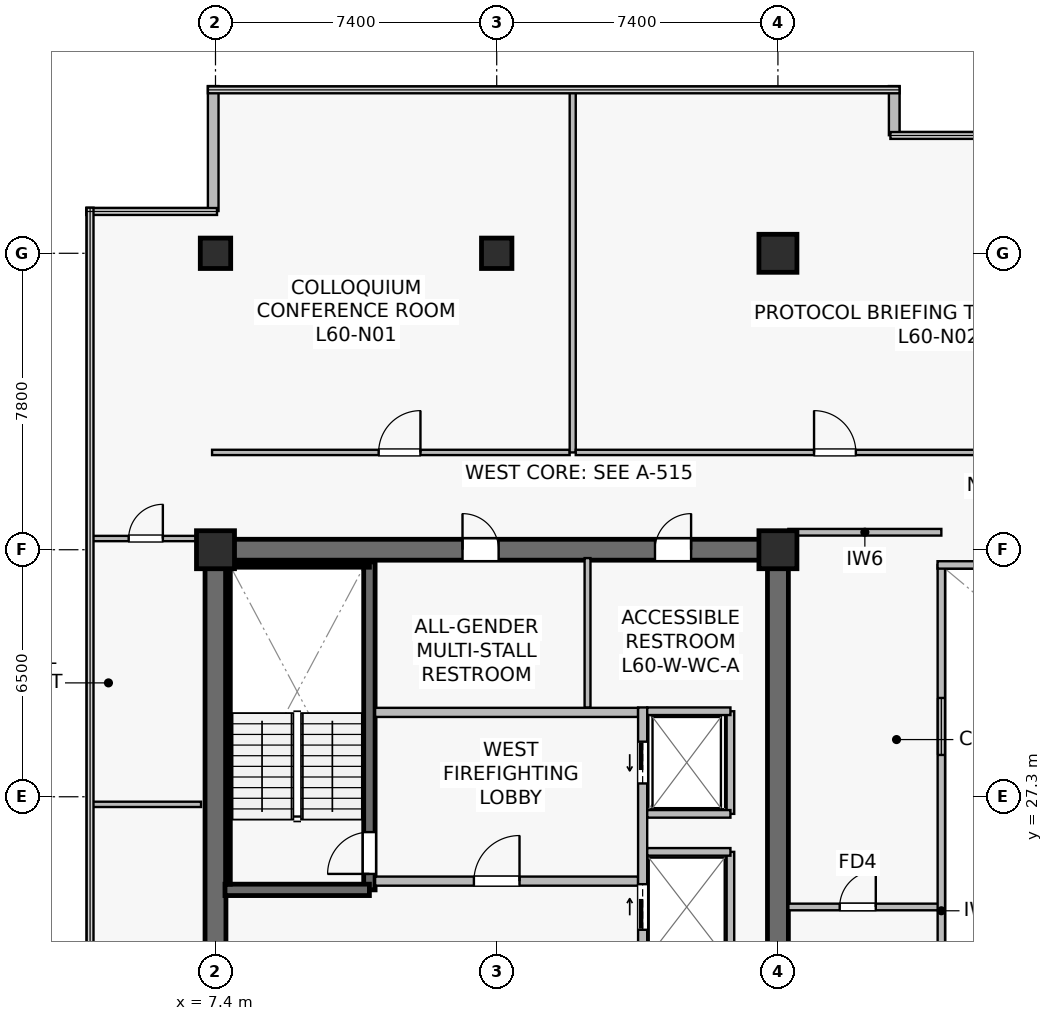
"""IFC4 building model, lengths in metres.
Left out: names, types, materials, properties, quantities, classifications, styles, units other than length and angle.
Written with IfcOpenShell. Run it as: python <this file> out.ifc"""

import sys

from ifc_helpers import new_model, si_unit, direction, frame, frame_2d, origin, origin_2d, place, context, subcontext, project, spatial, rectangle, extrude, source, transform, mapped, element, fill, save


model = new_model("IFC4")
c1 = context("Model", 3, precision=1e-05, world=origin(), true_north=direction((0.0, 1.0)))
c2 = subcontext(c1, "Body", "Model", "MODEL_VIEW")
j1 = project(units=[si_unit("LENGTHUNIT", "METRE"), si_unit("PLANEANGLEUNIT", "RADIAN")], contexts=[c1])
p1 = place(None, origin())
s1 = spatial("IfcSite", under=j1, at=p1, CompositionType="ELEMENT")
p2 = place(p1, origin())
s2 = spatial("IfcBuilding", under=s1, at=p2, CompositionType="ELEMENT")
p3 = place(p2, frame((0.0, 0.0, 250.6)))
s3 = spatial("IfcBuildingStorey", under=s2, at=p3, CompositionType="ELEMENT", Elevation=250.6)
p4 = place(p3, frame((7.125, 33.8, 0.0), z_axis=(0.0, 0.0, 1.0), x_axis=(1.0, 0.0, 0.0)))
e1 = element("IfcWall", 1, at=p4, inside=s3, PredefinedType="SHEAR", context=c2, shape_type="SweptSolid", body=[
    extrude(rectangle(XDim=15.35, YDim=0.55, at=frame_2d((7.675, 0.0))), origin(), (0.0, 0.0, 1.0), 3.8),
])
p5 = place(p4, frame((6.775, 0.0, 0.0)))
e2 = element("IfcOpeningElement", 2, at=p5, cuts=e1, PredefinedType="OPENING", context=c2, shape_type="SweptSolid", body=[
    extrude(rectangle(XDim=0.95, YDim=2.15, at=frame_2d((0.475, 1.075))), frame((0.0, 0.285, 0.0), z_axis=(0.0, -1.0, 0.0), x_axis=(1.0, 0.0, 0.0)), (0.0, 0.0, 1.0), 0.57),
])
p6 = place(p4, frame((11.84, 0.0, 0.0)))
e3 = element("IfcOpeningElement", 3, at=p6, cuts=e1, PredefinedType="OPENING", context=c2, shape_type="SweptSolid", body=[
    extrude(rectangle(XDim=0.95, YDim=2.15, at=frame_2d((0.475, 1.075))), frame((0.0, 0.285, 0.0), z_axis=(0.0, -1.0, 0.0), x_axis=(1.0, 0.0, 0.0)), (0.0, 0.0, 1.0), 0.57),
])
p7 = place(p3, frame((7.4, 15.075, 0.0), z_axis=(0.0, 0.0, 1.0), x_axis=(0.0, 1.0, 0.0)))
e4 = element("IfcWall", 4, at=p7, inside=s3, PredefinedType="SHEAR", context=c2, shape_type="SweptSolid", body=[
    extrude(rectangle(XDim=18.45, YDim=0.55, at=frame_2d((9.225, 0.0))), origin(), (0.0, 0.0, 1.0), 3.8),
])
p8 = place(p3, frame((22.2, 15.075, 0.0), z_axis=(0.0, 0.0, 1.0), x_axis=(0.0, 1.0, 0.0)))
e5 = element("IfcWall", 5, at=p8, inside=s3, PredefinedType="SHEAR", context=c2, shape_type="SweptSolid", body=[
    extrude(rectangle(XDim=18.45, YDim=0.55, at=frame_2d((9.225, 0.0))), origin(), (0.0, 0.0, 1.0), 3.8),
])
p9 = place(p8, frame((3.475, 0.0, 0.0)))
e6 = element("IfcOpeningElement", 6, at=p9, cuts=e5, PredefinedType="OPENING", context=c2, shape_type="SweptSolid", body=[
    extrude(rectangle(XDim=1.42, YDim=2.2, at=frame_2d((0.71, 1.1))), frame((0.0, 0.285, 0.0), z_axis=(0.0, -1.0, 0.0), x_axis=(1.0, 0.0, 0.0)), (0.0, 0.0, 1.0), 0.57),
])
p10 = place(p3, frame((11.45, 24.85, 0.0), z_axis=(0.0, 0.0, 1.0), x_axis=(0.0, 1.0, 0.0)))
e7 = element("IfcWall", 7, at=p10, inside=s3, PredefinedType="SHEAR", context=c2, shape_type="SweptSolid", body=[
    extrude(rectangle(XDim=8.63, YDim=0.3, at=frame_2d((4.315, 0.0))), origin(), (0.0, 0.0, 1.0), 3.8),
])
p11 = place(p10, frame((0.42, 0.0, 0.0)))
e8 = element("IfcOpeningElement", 8, at=p11, cuts=e7, PredefinedType="OPENING", context=c2, shape_type="SweptSolid", body=[
    extrude(rectangle(XDim=1.1, YDim=2.15, at=frame_2d((0.55, 1.075))), frame((0.0, 0.16, 0.0), z_axis=(0.0, -1.0, 0.0), x_axis=(1.0, 0.0, 0.0)), (0.0, 0.0, 1.0), 0.32),
])
p12 = place(p3, frame((7.65, 24.85, 0.0), z_axis=(0.0, 0.0, 1.0), x_axis=(1.0, 0.0, 0.0)))
e9 = element("IfcWall", 9, at=p12, inside=s3, PredefinedType="SHEAR", context=c2, shape_type="SweptSolid", body=[
    extrude(rectangle(XDim=3.8, YDim=0.3, at=frame_2d((1.9, 0.0))), origin(), (0.0, 0.0, 1.0), 3.8),
])
p13 = place(p3, frame((7.73, 33.4, 0.0), z_axis=(0.0, 0.0, 1.0), x_axis=(1.0, 0.0, 0.0)))
e10 = element("IfcWall", 10, at=p13, inside=s3, PredefinedType="SOLIDWALL", context=c2, shape_type="SweptSolid", body=[
    extrude(rectangle(XDim=3.72, YDim=0.12, at=frame_2d((1.86, 0.0))), origin(), (0.0, 0.0, 1.0), 3.8),
])
p14 = place(p3, frame((7.73, 25.0, 0.0), z_axis=(0.0, 0.0, 1.0), x_axis=(0.0, 1.0, 0.0)))
e11 = element("IfcWall", 11, at=p14, inside=s3, PredefinedType="SOLIDWALL", context=c2, shape_type="SweptSolid", body=[
    extrude(rectangle(XDim=8.32, YDim=0.12, at=frame_2d((4.16, 0.0))), origin(), (0.0, 0.0, 1.0), 3.8),
])
m1 = source(origin(), c2, "Body", "SweptSolid", [
    extrude(rectangle(XDim=1.0, YDim=1.0, at=origin_2d()), origin(), (0.0, 0.0, 1.0), 4.1),
])
for number, where, z_axis, x_axis in (
    (12, (7.4, 33.8, 0.0), (0.0, 0.0, 1.0), (1.0, 0.0, 0.0)),
    (13, (22.2, 33.8, 0.0), (0.0, 0.0, 1.0), (1.0, 0.0, 0.0)),
):
    element("IfcColumn", number, at=place(p3, frame(where, z_axis=z_axis, x_axis=x_axis)), inside=s3, PredefinedType="COLUMN", context=c2, shape_type="MappedRepresentation", body=[
        mapped(m1, transform((0.0, 0.0, 0.0), scale=1.0)),
    ])
m2 = source(origin(), c2, "Body", "SweptSolid", [
    extrude(rectangle(XDim=0.8, YDim=0.8, at=origin_2d()), origin(), (0.0, 0.0, 1.0), 4.1),
])
p15 = place(p3, frame((14.8, 41.6, 0.0), z_axis=(0.0, 0.0, 1.0), x_axis=(1.0, 0.0, 0.0)))
e14 = element("IfcColumn", 14, at=p15, inside=s3, PredefinedType="COLUMN", context=c2, shape_type="MappedRepresentation", body=[
    mapped(m2, transform((0.0, 0.0, 0.0), scale=1.0)),
])
p16 = place(p3, frame((22.2, 41.6, 0.0), z_axis=(0.0, 0.0, 1.0), x_axis=(1.0, 0.0, 0.0)))
e15 = element("IfcColumn", 15, at=p16, inside=s3, PredefinedType="COLUMN", context=c2, shape_type="MappedRepresentation", body=[
    mapped(m1, transform((0.0, 0.0, 0.0), scale=1.0)),
])
p17 = place(p3, frame((7.4, 41.6, 0.0), z_axis=(0.0, 0.0, 1.0), x_axis=(1.0, 0.0, 0.0)))
e16 = element("IfcColumn", 16, at=p17, inside=s3, PredefinedType="COLUMN", context=c2, shape_type="MappedRepresentation", body=[
    mapped(m2, transform((0.0, 0.0, 0.0), scale=1.0)),
])
p18 = place(p3, frame((25.26, 44.707, 0.0), z_axis=(0.0, 0.0, 1.0), x_axis=(0.0, 1.0, 0.0)))
e17 = element("IfcWall", 17, at=p18, inside=s3, PredefinedType="STANDARD", context=c2, shape_type="SweptSolid", body=[
    extrude(rectangle(XDim=1.293, YDim=0.28, at=frame_2d((0.646, 0.0))), origin(), (0.0, 0.0, 1.0), 3.8),
])
p19 = place(p3, frame((7.34, 46.0, 0.0), z_axis=(0.0, 0.0, 1.0), x_axis=(0.0, -1.0, 0.0)))
e18 = element("IfcWall", 18, at=p19, inside=s3, PredefinedType="STANDARD", context=c2, shape_type="SweptSolid", body=[
    extrude(rectangle(XDim=3.288, YDim=0.28, at=frame_2d((1.644, 0.0))), origin(), (0.0, 0.0, 1.0), 3.8),
])
p20 = place(p3, frame((11.6, 25.08, 0.0), z_axis=(0.0, 0.0, 1.0), x_axis=(1.0, 0.0, 0.0)))
e19 = element("IfcWall", 19, at=p20, inside=s3, PredefinedType="SOLIDWALL", context=c2, shape_type="SweptSolid", body=[
    extrude(rectangle(XDim=6.92, YDim=0.24, at=frame_2d((3.46, 0.0))), origin(), (0.0, 0.0, 1.0), 3.197),
])
p21 = place(p20, frame((2.6, 0.0, 0.0)))
e20 = element("IfcOpeningElement", 20, at=p21, cuts=e19, PredefinedType="OPENING", context=c2, shape_type="SweptSolid", body=[
    extrude(rectangle(XDim=1.2, YDim=2.16, at=frame_2d((0.6, 1.08))), frame((0.0, 0.13, 0.0), z_axis=(0.0, -1.0, 0.0), x_axis=(1.0, 0.0, 0.0)), (0.0, 0.0, 1.0), 0.26),
])
p22 = place(p3, frame((11.6, 29.52, 0.0), z_axis=(0.0, 0.0, 1.0), x_axis=(1.0, 0.0, 0.0)))
e21 = element("IfcWall", 21, at=p22, inside=s3, PredefinedType="SOLIDWALL", context=c2, shape_type="SweptSolid", body=[
    extrude(rectangle(XDim=6.92, YDim=0.24, at=frame_2d((3.46, 0.0))), origin(), (0.0, 0.0, 1.0), 3.197),
])
p23 = place(p3, frame((18.64, 22.8, 0.0), z_axis=(0.0, 0.0, 1.0), x_axis=(0.0, 1.0, 0.0)))
e22 = element("IfcWall", 22, at=p23, inside=s3, PredefinedType="SOLIDWALL", context=c2, shape_type="SweptSolid", body=[
    extrude(rectangle(XDim=6.85, YDim=0.24, at=frame_2d((3.425, 0.0))), origin(), (0.0, 0.0, 1.0), 2.935),
])
p24 = place(p23, frame((4.85, 0.0, 0.0)))
e23 = element("IfcOpeningElement", 23, at=p24, cuts=e22, PredefinedType="OPENING", context=c2, shape_type="SweptSolid", body=[
    extrude(rectangle(XDim=1.1, YDim=2.22, at=frame_2d((0.55, 1.11))), frame((0.0, 0.13, 0.0), z_axis=(0.0, -1.0, 0.0), x_axis=(1.0, 0.0, 0.0)), (0.0, 0.0, 1.0), 0.26),
])
p25 = place(p23, frame((1.0, 0.0, 0.0)))
e24 = element("IfcOpeningElement", 24, at=p25, cuts=e22, PredefinedType="OPENING", context=c2, shape_type="SweptSolid", body=[
    extrude(rectangle(XDim=1.2, YDim=2.22, at=frame_2d((0.6, 1.11))), frame((0.0, 0.13, 0.0), z_axis=(0.0, -1.0, 0.0), x_axis=(1.0, 0.0, 0.0)), (0.0, 0.0, 1.0), 0.26),
])
p26 = place(p3, frame((20.95, 26.85, 0.0), z_axis=(0.0, 0.0, 1.0), x_axis=(0.0, 1.0, 0.0)))
e25 = element("IfcWall", 25, at=p26, inside=s3, PredefinedType="SOLIDWALL", context=c2, shape_type="SweptSolid", body=[
    extrude(rectangle(XDim=2.7, YDim=0.2, at=frame_2d((1.35, 0.0))), origin(), (0.0, 0.0, 1.0), 3.8),
])
p27 = place(p3, frame((18.76, 29.55, 0.0), z_axis=(0.0, 0.0, 1.0), x_axis=(1.0, 0.0, 0.0)))
e26 = element("IfcWall", 26, at=p27, inside=s3, PredefinedType="SOLIDWALL", context=c2, shape_type="SweptSolid", body=[
    extrude(rectangle(XDim=2.19, YDim=0.2, at=frame_2d((1.095, 0.0))), origin(), (0.0, 0.0, 1.0), 3.8),
])
p28 = place(p3, frame((18.76, 26.85, 0.0), z_axis=(0.0, 0.0, 1.0), x_axis=(1.0, 0.0, 0.0)))
e27 = element("IfcWall", 27, at=p28, inside=s3, PredefinedType="SOLIDWALL", context=c2, shape_type="SweptSolid", body=[
    extrude(rectangle(XDim=2.19, YDim=0.2, at=frame_2d((1.095, 0.0))), origin(), (0.0, 0.0, 1.0), 3.197),
])
p29 = place(p3, frame((20.95, 22.95, 0.0), z_axis=(0.0, 0.0, 1.0), x_axis=(0.0, 1.0, 0.0)))
e28 = element("IfcWall", 28, at=p29, inside=s3, PredefinedType="SOLIDWALL", context=c2, shape_type="SweptSolid", body=[
    extrude(rectangle(XDim=2.9, YDim=0.2, at=frame_2d((1.45, 0.0))), origin(), (0.0, 0.0, 1.0), 2.935),
])
p30 = place(p3, frame((18.76, 25.85, 0.0), z_axis=(0.0, 0.0, 1.0), x_axis=(1.0, 0.0, 0.0)))
e29 = element("IfcWall", 29, at=p30, inside=s3, PredefinedType="SOLIDWALL", context=c2, shape_type="SweptSolid", body=[
    extrude(rectangle(XDim=2.19, YDim=0.2, at=frame_2d((1.095, 0.0))), origin(), (0.0, 0.0, 1.0), 3.8),
])
p31 = place(p3, frame((17.19, 29.65, 0.0), z_axis=(0.0, 0.0, 1.0), x_axis=(0.0, 1.0, 0.0)))
e30 = element("IfcWall", 30, at=p31, inside=s3, PredefinedType="PLUMBINGWALL", context=c2, shape_type="SweptSolid", body=[
    extrude(rectangle(XDim=3.93, YDim=0.155, at=frame_2d((1.965, 0.0))), origin(), (0.0, 0.0, 1.0), 3.8),
])
p32 = place(p3, frame((22.475, 34.26, 0.0), z_axis=(0.0, 0.0, 1.0), x_axis=(1.0, 0.0, 0.0)))
e31 = element("IfcWall", 31, at=p32, inside=s3, PredefinedType="PARTITIONING", context=c2, shape_type="SweptSolid", body=[
    extrude(rectangle(XDim=4.025, YDim=0.175, at=frame_2d((2.012, 0.0))), origin(), (0.0, 0.0, 1.0), 3.535),
])
p33 = place(p3, frame((22.475, 24.4, 0.0), z_axis=(0.0, 0.0, 1.0), x_axis=(1.0, 0.0, 0.0)))
e32 = element("IfcWall", 32, at=p33, inside=s3, PredefinedType="PARTITIONING", context=c2, shape_type="SweptSolid", body=[
    extrude(rectangle(XDim=4.025, YDim=0.175, at=frame_2d((2.012, 0.0))), origin(), (0.0, 0.0, 1.0), 3.8),
])
p34 = place(p33, frame((1.35, 0.0, 0.0)))
e33 = element("IfcOpeningElement", 33, at=p34, cuts=e32, PredefinedType="OPENING", context=c2, shape_type="SweptSolid", body=[
    extrude(rectangle(XDim=0.95, YDim=2.15, at=frame_2d((0.475, 1.075))), frame((0.0, 0.098, 0.0), z_axis=(0.0, -1.0, 0.0), x_axis=(1.0, 0.0, 0.0)), (0.0, 0.0, 1.0), 0.195),
])
p35 = place(p3, frame((26.5, 15.2, 0.0), z_axis=(0.0, 0.0, 1.0), x_axis=(0.0, 1.0, 0.0)))
e34 = element("IfcWall", 34, at=p35, inside=s3, PredefinedType="SOLIDWALL", context=c2, shape_type="SweptSolid", body=[
    extrude(rectangle(XDim=18.2, YDim=0.195, at=frame_2d((9.1, 0.0))), origin(), (0.0, 0.0, 1.0), 3.8),
])
p36 = place(p35, frame((1.8, 0.0, 0.9)))
e35 = element("IfcOpeningElement", 35, at=p36, cuts=e34, PredefinedType="OPENING", context=c2, shape_type="SweptSolid", body=[
    extrude(rectangle(XDim=1.5, YDim=1.4, at=frame_2d((0.75, 0.7))), frame((0.0, 0.107, 0.0), z_axis=(0.0, -1.0, 0.0), x_axis=(1.0, 0.0, 0.0)), (0.0, 0.0, 1.0), 0.215),
])
p37 = place(p35, frame((13.2, 0.0, 0.9)))
e36 = element("IfcOpeningElement", 36, at=p37, cuts=e34, PredefinedType="OPENING", context=c2, shape_type="SweptSolid", body=[
    extrude(rectangle(XDim=1.5, YDim=1.4, at=frame_2d((0.75, 0.7))), frame((0.0, 0.107, 0.0), z_axis=(0.0, -1.0, 0.0), x_axis=(1.0, 0.0, 0.0)), (0.0, 0.0, 1.0), 0.215),
])
p38 = place(p3, frame((26.4, 33.4, 0.0), z_axis=(0.0, 0.0, 1.0), x_axis=(1.0, 0.0, 0.0)))
e37 = element("IfcWall", 37, at=p38, inside=s3, PredefinedType="SOLIDWALL", context=c2, shape_type="SweptSolid", body=[
    extrude(rectangle(XDim=22.0, YDim=0.195, at=frame_2d((11.0, 0.0))), origin(), (0.0, 0.0, 1.0), 3.8),
])
p39 = place(p3, frame((7.31, 36.36, 0.0), z_axis=(0.0, 0.0, 1.0), x_axis=(1.0, 0.0, 0.0)))
e38 = element("IfcWall", 38, at=p39, inside=s3, PredefinedType="PARTITIONING", context=c2, shape_type="SweptSolid", body=[
    extrude(rectangle(XDim=9.41, YDim=0.14, at=frame_2d((4.705, 0.0))), origin(), (0.0, 0.0, 1.0), 3.197),
])
p40 = place(p39, frame((4.383, 0.0, 0.0)))
e39 = element("IfcOpeningElement", 39, at=p40, cuts=e38, PredefinedType="OPENING", context=c2, shape_type="SweptSolid", body=[
    extrude(rectangle(XDim=1.1, YDim=2.18, at=frame_2d((0.55, 1.09))), frame((0.0, 0.08, 0.0), z_axis=(0.0, -1.0, 0.0), x_axis=(1.0, 0.0, 0.0)), (0.0, 0.0, 1.0), 0.16),
])
p41 = place(p3, frame((16.8, 36.36, 0.0), z_axis=(0.0, 0.0, 1.0), x_axis=(0.0, 1.0, 0.0)))
e40 = element("IfcWall", 40, at=p41, inside=s3, PredefinedType="PARTITIONING", context=c2, shape_type="SweptSolid", body=[
    extrude(rectangle(XDim=9.53, YDim=0.16, at=frame_2d((4.765, 0.0))), origin(), (0.0, 0.0, 1.0), 3.135),
])
p42 = place(p3, frame((16.88, 36.36, 0.0), z_axis=(0.0, 0.0, 1.0), x_axis=(1.0, 0.0, 0.0)))
e41 = element("IfcWall", 41, at=p42, inside=s3, PredefinedType="PARTITIONING", context=c2, shape_type="SweptSolid", body=[
    extrude(rectangle(XDim=16.24, YDim=0.14, at=frame_2d((8.12, 0.0))), origin(), (0.0, 0.0, 1.0), 3.197),
])
p43 = place(p42, frame((6.271, 0.0, 0.0)))
e42 = element("IfcOpeningElement", 42, at=p43, cuts=e41, PredefinedType="OPENING", context=c2, shape_type="SweptSolid", body=[
    extrude(rectangle(XDim=1.1, YDim=2.18, at=frame_2d((0.55, 1.09))), frame((0.0, 0.08, 0.0), z_axis=(0.0, -1.0, 0.0), x_axis=(1.0, 0.0, 0.0)), (0.0, 0.0, 1.0), 0.16),
])
p44 = place(p3, frame((4.11, 27.1, 0.0), z_axis=(0.0, 0.0, 1.0), x_axis=(1.0, 0.0, 0.0)))
e43 = element("IfcWall", 43, at=p44, inside=s3, PredefinedType="PARTITIONING", context=c2, shape_type="SweptSolid", body=[
    extrude(rectangle(XDim=2.91, YDim=0.14, at=frame_2d((1.455, 0.0))), origin(), (0.0, 0.0, 1.0), 3.8),
])
p45 = place(p3, frame((4.11, 34.095, 0.0), z_axis=(0.0, 0.0, 1.0), x_axis=(1.0, 0.0, 0.0)))
e44 = element("IfcWall", 44, at=p45, inside=s3, PredefinedType="PARTITIONING", context=c2, shape_type="SweptSolid", body=[
    extrude(rectangle(XDim=2.91, YDim=0.14, at=frame_2d((1.455, 0.0))), origin(), (0.0, 0.0, 1.0), 3.8),
])
p46 = place(p45, frame((1.005, 0.0, 0.0)))
e45 = element("IfcOpeningElement", 45, at=p46, cuts=e44, PredefinedType="OPENING", context=c2, shape_type="SweptSolid", body=[
    extrude(rectangle(XDim=0.9, YDim=2.1, at=frame_2d((0.45, 1.05))), frame((0.0, 0.08, 0.0), z_axis=(0.0, -1.0, 0.0), x_axis=(1.0, 0.0, 0.0)), (0.0, 0.0, 1.0), 0.16),
])
m3 = source(origin(), c2, "Body", "SweptSolid", [
    extrude(rectangle(XDim=1.5, YDim=1.4, at=frame_2d((0.75, 0.7))), frame((0.0, 0.03, 0.0), z_axis=(0.0, -1.0, 0.0), x_axis=(1.0, 0.0, 0.0)), (0.0, 0.0, 1.0), 0.06),
])
p47 = place(p37, origin())
e46 = element("IfcWindow", 46, at=p47, inside=s3, PartitioningType="SINGLE_PANEL", PredefinedType="WINDOW", context=c2, shape_type="MappedRepresentation", body=[
    mapped(m3, transform((0.0, 0.0, 0.0), scale=1.0)),
])
fill(e36, e46)
m4 = source(origin(), c2, "Body", "SweptSolid", [
    extrude(rectangle(XDim=1.1, YDim=2.15, at=frame_2d((0.55, 1.075))), frame((0.0, 0.025, 0.0), z_axis=(0.0, -1.0, 0.0), x_axis=(1.0, 0.0, 0.0)), (0.0, 0.0, 1.0), 0.05),
])
p48 = place(p11, origin())
e47 = element("IfcDoor", 47, at=p48, inside=s3, OperationType="SINGLE_SWING_LEFT", PredefinedType="DOOR", context=c2, shape_type="MappedRepresentation", body=[
    mapped(m4, transform((0.0, 0.0, 0.0), scale=1.0)),
])
fill(e8, e47)
m5 = source(origin(), c2, "Body", "SweptSolid", [
    extrude(rectangle(XDim=1.2, YDim=2.16, at=frame_2d((0.6, 1.08))), frame((0.0, 0.025, 0.0), z_axis=(0.0, -1.0, 0.0), x_axis=(1.0, 0.0, 0.0)), (0.0, 0.0, 1.0), 0.05),
])
p49 = place(p21, origin())
e48 = element("IfcDoor", 48, at=p49, inside=s3, OperationType="SINGLE_SWING_RIGHT", PredefinedType="DOOR", context=c2, shape_type="MappedRepresentation", body=[
    mapped(m5, transform((0.0, 0.0, 0.0), scale=1.0)),
])
fill(e20, e48)
m6 = source(origin(), c2, "Body", "SweptSolid", [
    extrude(rectangle(XDim=1.1, YDim=2.22, at=frame_2d((0.55, 1.11))), frame((0.0, 0.025, 0.0), z_axis=(0.0, -1.0, 0.0), x_axis=(1.0, 0.0, 0.0)), (0.0, 0.0, 1.0), 0.05),
])
p50 = place(p24, origin())
e49 = element("IfcDoor", 49, at=p50, inside=s3, OperationType="SLIDING_TO_LEFT", PredefinedType="USERDEFINED", context=c2, shape_type="MappedRepresentation", body=[
    mapped(m6, transform((0.0, 0.0, 0.0), scale=1.0)),
])
fill(e23, e49)
m7 = source(origin(), c2, "Body", "SweptSolid", [
    extrude(rectangle(XDim=1.2, YDim=2.22, at=frame_2d((0.6, 1.11))), frame((0.0, 0.025, 0.0), z_axis=(0.0, -1.0, 0.0), x_axis=(1.0, 0.0, 0.0)), (0.0, 0.0, 1.0), 0.05),
])
p51 = place(p25, origin())
e50 = element("IfcDoor", 50, at=p51, inside=s3, OperationType="SLIDING_TO_RIGHT", PredefinedType="USERDEFINED", context=c2, shape_type="MappedRepresentation", body=[
    mapped(m7, transform((0.0, 0.0, 0.0), scale=1.0)),
])
fill(e24, e50)
m8 = source(origin(), c2, "Body", "SweptSolid", [
    extrude(rectangle(XDim=0.95, YDim=2.15, at=frame_2d((0.475, 1.075))), frame((0.0, 0.025, 0.0), z_axis=(0.0, -1.0, 0.0), x_axis=(1.0, 0.0, 0.0)), (0.0, 0.0, 1.0), 0.05),
])
p52 = place(p5, origin())
e51 = element("IfcDoor", 51, at=p52, inside=s3, OperationType="SINGLE_SWING_LEFT", PredefinedType="DOOR", context=c2, shape_type="MappedRepresentation", body=[
    mapped(m8, transform((0.0, 0.0, 0.0), scale=1.0)),
])
fill(e2, e51)
p53 = place(p6, origin())
e52 = element("IfcDoor", 52, at=p53, inside=s3, OperationType="SINGLE_SWING_RIGHT", PredefinedType="DOOR", context=c2, shape_type="MappedRepresentation", body=[
    mapped(m8, transform((0.0, 0.0, 0.0), scale=1.0)),
])
fill(e3, e52)
p54 = place(p34, origin())
e53 = element("IfcDoor", 53, at=p54, inside=s3, OperationType="SINGLE_SWING_RIGHT", PredefinedType="DOOR", context=c2, shape_type="MappedRepresentation", body=[
    mapped(m8, transform((0.0, 0.0, 0.0), scale=1.0)),
])
fill(e33, e53)
m9 = source(origin(), c2, "Body", "SweptSolid", [
    extrude(rectangle(XDim=1.1, YDim=2.18, at=frame_2d((0.55, 1.09))), frame((0.0, 0.025, 0.0), z_axis=(0.0, -1.0, 0.0), x_axis=(1.0, 0.0, 0.0)), (0.0, 0.0, 1.0), 0.05),
])
p55 = place(p40, origin())
e54 = element("IfcDoor", 54, at=p55, inside=s3, OperationType="SINGLE_SWING_RIGHT", PredefinedType="DOOR", context=c2, shape_type="MappedRepresentation", body=[
    mapped(m9, transform((0.0, 0.0, 0.0), scale=1.0)),
])
fill(e39, e54)
p56 = place(p43, origin())
e55 = element("IfcDoor", 55, at=p56, inside=s3, OperationType="SINGLE_SWING_LEFT", PredefinedType="DOOR", context=c2, shape_type="MappedRepresentation", body=[
    mapped(m9, transform((0.0, 0.0, 0.0), scale=1.0)),
])
fill(e42, e55)
m10 = source(origin(), c2, "Body", "SweptSolid", [
    extrude(rectangle(XDim=0.9, YDim=2.1, at=frame_2d((0.45, 1.05))), frame((0.0, 0.025, 0.0), z_axis=(0.0, -1.0, 0.0), x_axis=(1.0, 0.0, 0.0)), (0.0, 0.0, 1.0), 0.05),
])
p57 = place(p46, origin())
e56 = element("IfcDoor", 56, at=p57, inside=s3, OperationType="SINGLE_SWING_RIGHT", PredefinedType="DOOR", context=c2, shape_type="MappedRepresentation", body=[
    mapped(m10, transform((0.0, 0.0, 0.0), scale=1.0)),
])
fill(e45, e56)
save(model, sys.argv[1])
